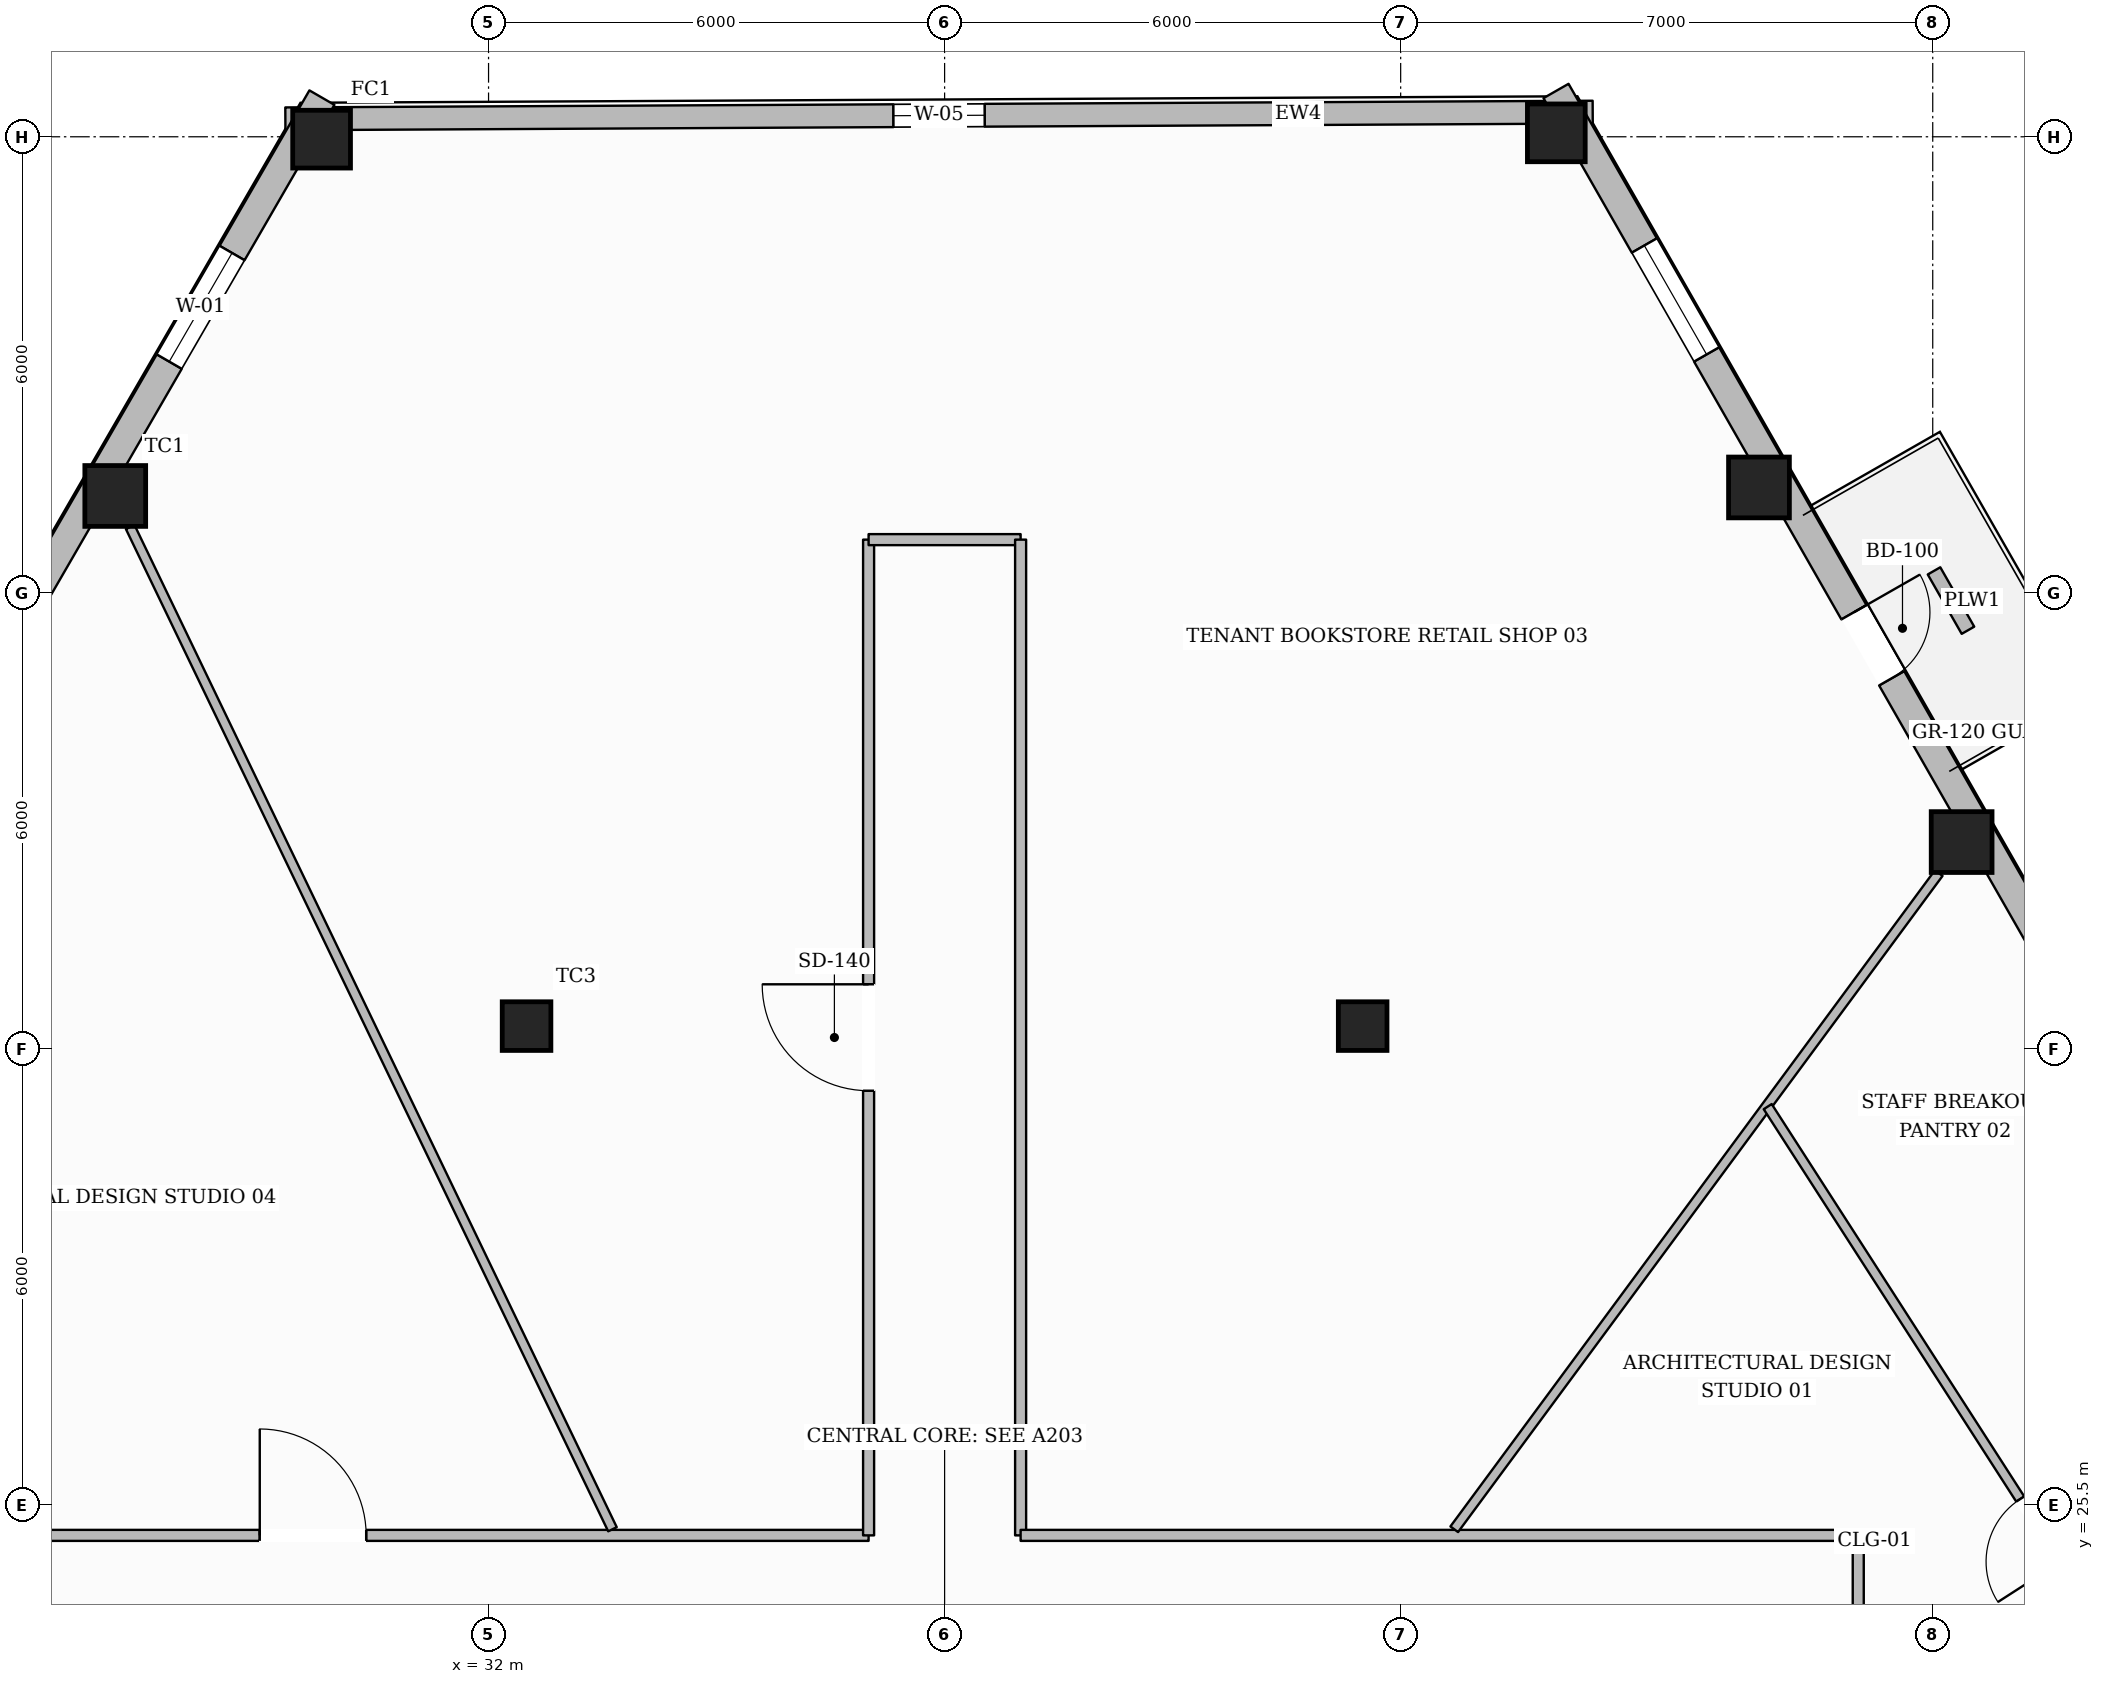
"""IFC4 building model, lengths in metres.
Left out: names, types, materials, properties, quantities, classifications, styles, units other than length and angle.
Written with IfcOpenShell. Run it as: python <this file> out.ifc"""

import sys

from ifc_helpers import new_model, si_unit, direction, frame, frame_2d, origin, origin_2d, place, context, subcontext, project, spatial, rectangle, hollow_rectangle, extrude, element, fill, save


model = new_model("IFC4")
c1 = context("Model", 3, precision=1e-05, world=origin(), true_north=direction((0.0, 1.0)))
c2 = subcontext(c1, "Body", "Model", "MODEL_VIEW")
j1 = project(units=[si_unit("LENGTHUNIT", "METRE"), si_unit("PLANEANGLEUNIT", "RADIAN")], contexts=[c1])
p1 = place(None, origin())
s1 = spatial("IfcSite", under=j1, at=p1, CompositionType="ELEMENT")
p2 = place(p1, origin())
s2 = spatial("IfcBuilding", under=s1, at=p2, CompositionType="ELEMENT")
p3 = place(p2, frame((0.0, 0.0, 9.85)))
s3 = spatial("IfcBuildingStorey", under=s2, at=p3, CompositionType="ELEMENT", Elevation=9.85)
p4 = place(p3, frame((29.803, 43.469, 0.0), z_axis=(0.0, 0.0, 1.0), x_axis=(1.0, 0.0, 0.0)))
e1 = element("IfcColumn", 1, at=p4, inside=s3, PredefinedType="COLUMN", context=c2, shape_type="SweptSolid", body=[
    extrude(hollow_rectangle(XDim=0.76, YDim=0.76, WallThickness=0.035, at=origin_2d()), origin(), (0.0, 0.0, 1.0), 3.59),
])
for number, where, z_axis, x_axis in (
    (2, (27.089, 38.774, 0.0), (0.0, 0.0, 1.0), (1.0, 0.0, 0.0)),
    (3, (51.38, 34.221, 0.0), (0.0, 0.0, 1.0), (1.0, 0.0, 0.0)),
    (4, (48.714, 38.886, 0.0), (0.0, 0.0, 1.0), (1.0, 0.0, 0.0)),
):
    element("IfcColumn", number, at=place(p3, frame(where, z_axis=z_axis, x_axis=x_axis)), inside=s3, PredefinedType="COLUMN", context=c2, shape_type="SweptSolid", body=[
        extrude(hollow_rectangle(XDim=0.8, YDim=0.8, WallThickness=0.036, at=origin_2d()), origin(), (0.0, 0.0, 1.0), 3.59),
    ])
p5 = place(p3, frame((46.048, 43.552, 0.0), z_axis=(0.0, 0.0, 1.0), x_axis=(1.0, 0.0, 0.0)))
e5 = element("IfcColumn", 5, at=p5, inside=s3, PredefinedType="COLUMN", context=c2, shape_type="SweptSolid", body=[
    extrude(hollow_rectangle(XDim=0.76, YDim=0.76, WallThickness=0.035, at=origin_2d()), origin(), (0.0, 0.0, 1.0), 3.59),
])
for number, where, z_axis, x_axis in (
    (6, (32.5, 31.8, 0.0), (0.0, 0.0, 1.0), (1.0, 0.0, 0.0)),
    (7, (43.5, 31.8, 0.0), (0.0, 0.0, 1.0), (1.0, 0.0, 0.0)),
):
    element("IfcColumn", number, at=place(p3, frame(where, z_axis=z_axis, x_axis=x_axis)), inside=s3, PredefinedType="COLUMN", context=c2, shape_type="SweptSolid", body=[
        extrude(hollow_rectangle(XDim=0.64, YDim=0.64, WallThickness=0.028, at=origin_2d()), origin(), (0.0, 0.0, 1.0), 3.59),
    ])
p6 = place(p3, frame((29.327, 43.736, 0.0), z_axis=(0.0, 0.0, 1.0), x_axis=(0.999986871538, 0.005124134289, 0.0)))
e8 = element("IfcWall", 8, at=p6, inside=s3, PredefinedType="STANDARD", context=c2, shape_type="SweptSolid", body=[
    extrude(rectangle(XDim=17.2, YDim=0.3, at=frame_2d((8.6, 0.0))), origin(), (0.0, 0.0, 1.0), 2.97),
])
p7 = place(p6, frame((8.0, 0.0, 0.65)))
e9 = element("IfcOpeningElement", 9, at=p7, cuts=e8, PredefinedType="OPENING", context=c2, shape_type="SweptSolid", body=[
    extrude(rectangle(XDim=1.2, YDim=1.7, at=frame_2d((0.6, 0.85))), frame((0.0, 0.16, 0.0), z_axis=(0.0, -1.0, 0.0), x_axis=(1.0, 0.0, 0.0)), (0.0, 0.0, 1.0), 0.32),
])
p8 = place(p3, frame((13.044, 15.027, 0.0), z_axis=(0.0, 0.0, 1.0), x_axis=(0.500616330433, 0.865669272704, 0.0)))
e10 = element("IfcWall", 10, at=p8, inside=s3, PredefinedType="STANDARD", context=c2, shape_type="SweptSolid", body=[
    extrude(rectangle(XDim=33.487, YDim=0.38, at=frame_2d((16.743, 0.0))), origin(), (0.0, 0.0, 1.0), 2.97),
])
p9 = place(p8, frame((7.972, 0.0, 0.0)))
e11 = element("IfcOpeningElement", 11, at=p9, cuts=e10, PredefinedType="OPENING", context=c2, shape_type="SweptSolid", body=[
    extrude(rectangle(XDim=1.0, YDim=2.2, at=frame_2d((0.5, 1.1))), frame((0.0, 0.2, 0.0), z_axis=(0.0, -1.0, 0.0), x_axis=(1.0, 0.0, 0.0)), (0.0, 0.0, 1.0), 0.4),
])
p10 = place(p8, frame((29.475, 0.0, 0.65)))
e12 = element("IfcOpeningElement", 12, at=p10, cuts=e10, PredefinedType="OPENING", context=c2, shape_type="SweptSolid", body=[
    extrude(rectangle(XDim=1.65, YDim=1.75, at=frame_2d((0.825, 0.875))), frame((0.0, 0.2, 0.0), z_axis=(0.0, -1.0, 0.0), x_axis=(1.0, 0.0, 0.0)), (0.0, 0.0, 1.0), 0.4),
])
p11 = place(p8, frame((24.052, 0.0, 0.65)))
e13 = element("IfcOpeningElement", 13, at=p11, cuts=e10, PredefinedType="OPENING", context=c2, shape_type="SweptSolid", body=[
    extrude(rectangle(XDim=1.65, YDim=1.75, at=frame_2d((0.825, 0.875))), frame((0.0, 0.2, 0.0), z_axis=(0.0, -1.0, 0.0), x_axis=(1.0, 0.0, 0.0)), (0.0, 0.0, 1.0), 0.4),
])
p12 = place(p8, frame((18.63, 0.0, 0.65)))
e14 = element("IfcOpeningElement", 14, at=p12, cuts=e10, PredefinedType="OPENING", context=c2, shape_type="SweptSolid", body=[
    extrude(rectangle(XDim=1.65, YDim=1.75, at=frame_2d((0.825, 0.875))), frame((0.0, 0.2, 0.0), z_axis=(0.0, -1.0, 0.0), x_axis=(1.0, 0.0, 0.0)), (0.0, 0.0, 1.0), 0.4),
])
p13 = place(p8, frame((2.362, 0.0, 0.65)))
e15 = element("IfcOpeningElement", 15, at=p13, cuts=e10, PredefinedType="OPENING", context=c2, shape_type="SweptSolid", body=[
    extrude(rectangle(XDim=1.65, YDim=1.75, at=frame_2d((0.825, 0.875))), frame((0.0, 0.2, 0.0), z_axis=(0.0, -1.0, 0.0), x_axis=(1.0, 0.0, 0.0)), (0.0, 0.0, 1.0), 0.4),
])
p14 = place(p3, frame((46.044, 44.103, 0.0), z_axis=(0.0, 0.0, 1.0), x_axis=(0.496189626602, -0.86821417545, 0.0)))
e16 = element("IfcWall", 16, at=p14, inside=s3, PredefinedType="STANDARD", context=c2, shape_type="SweptSolid", body=[
    extrude(rectangle(XDim=33.196, YDim=0.38, at=frame_2d((16.598, 0.0))), origin(), (0.0, 0.0, 1.0), 2.97),
])
p15 = place(p14, frame((7.899, 0.0, 0.0)))
e17 = element("IfcOpeningElement", 17, at=p15, cuts=e16, PredefinedType="OPENING", context=c2, shape_type="SweptSolid", body=[
    extrude(rectangle(XDim=1.0, YDim=2.2, at=frame_2d((0.5, 1.1))), frame((0.0, 0.2, 0.0), z_axis=(0.0, -1.0, 0.0), x_axis=(1.0, 0.0, 0.0)), (0.0, 0.0, 1.0), 0.4),
])
p16 = place(p14, frame((29.209, 0.0, 0.65)))
e18 = element("IfcOpeningElement", 18, at=p16, cuts=e16, PredefinedType="OPENING", context=c2, shape_type="SweptSolid", body=[
    extrude(rectangle(XDim=1.65, YDim=1.75, at=frame_2d((0.825, 0.875))), frame((0.0, 0.2, 0.0), z_axis=(0.0, -1.0, 0.0), x_axis=(1.0, 0.0, 0.0)), (0.0, 0.0, 1.0), 0.4),
])
p17 = place(p14, frame((23.835, 0.0, 0.65)))
e19 = element("IfcOpeningElement", 19, at=p17, cuts=e16, PredefinedType="OPENING", context=c2, shape_type="SweptSolid", body=[
    extrude(rectangle(XDim=1.65, YDim=1.75, at=frame_2d((0.825, 0.875))), frame((0.0, 0.2, 0.0), z_axis=(0.0, -1.0, 0.0), x_axis=(1.0, 0.0, 0.0)), (0.0, 0.0, 1.0), 0.4),
])
p18 = place(p14, frame((18.462, 0.0, 0.65)))
e20 = element("IfcOpeningElement", 20, at=p18, cuts=e16, PredefinedType="OPENING", context=c2, shape_type="SweptSolid", body=[
    extrude(rectangle(XDim=1.65, YDim=1.75, at=frame_2d((0.825, 0.875))), frame((0.0, 0.2, 0.0), z_axis=(0.0, -1.0, 0.0), x_axis=(1.0, 0.0, 0.0)), (0.0, 0.0, 1.0), 0.4),
])
p19 = place(p14, frame((2.342, 0.0, 0.65)))
e21 = element("IfcOpeningElement", 21, at=p19, cuts=e16, PredefinedType="OPENING", context=c2, shape_type="SweptSolid", body=[
    extrude(rectangle(XDim=1.65, YDim=1.75, at=frame_2d((0.825, 0.875))), frame((0.0, 0.2, 0.0), z_axis=(0.0, -1.0, 0.0), x_axis=(1.0, 0.0, 0.0)), (0.0, 0.0, 1.0), 0.4),
])
p20 = place(p3, frame((51.463, 37.008, 0.0), z_axis=(0.0, 0.0, 1.0), x_axis=(-0.496109726922, 0.868259833721, 0.0)))
e22 = element("IfcWall", 22, at=p20, inside=s3, PredefinedType="USERDEFINED", context=c2, shape_type="SweptSolid", body=[
    extrude(rectangle(XDim=0.9, YDim=0.19, at=frame_2d((0.45, 0.0))), origin(), (0.0, 0.0, 1.0), 0.5),
])
p21 = place(p3, frame((25.98, 25.1, 0.0), z_axis=(0.0, 0.0, 1.0), x_axis=(1.0, 0.0, 0.0)))
e23 = element("IfcWall", 23, at=p21, inside=s3, PredefinedType="PARTITIONING", context=c2, shape_type="SweptSolid", body=[
    extrude(rectangle(XDim=11.02, YDim=0.145, at=frame_2d((5.51, 0.0))), origin(), (0.0, 0.0, 1.0), 3.59),
])
p22 = place(p21, frame((3.01, 0.0, 0.0)))
e24 = element("IfcOpeningElement", 24, at=p22, cuts=e23, PredefinedType="OPENING", context=c2, shape_type="SweptSolid", body=[
    extrude(rectangle(XDim=1.4, YDim=2.2, at=frame_2d((0.7, 1.1))), frame((0.0, 0.083, 0.0), z_axis=(0.0, -1.0, 0.0), x_axis=(1.0, 0.0, 0.0)), (0.0, 0.0, 1.0), 0.165),
])
p23 = place(p3, frame((37.0, 25.1, 0.0), z_axis=(0.0, 0.0, 1.0), x_axis=(0.0, 1.0, 0.0)))
e25 = element("IfcWall", 25, at=p23, inside=s3, PredefinedType="PARTITIONING", context=c2, shape_type="SweptSolid", body=[
    extrude(rectangle(XDim=13.1, YDim=0.145, at=frame_2d((6.55, 0.0))), origin(), (0.0, 0.0, 1.0), 3.59),
])
p24 = place(p23, frame((5.85, 0.0, 0.0)))
e26 = element("IfcOpeningElement", 26, at=p24, cuts=e25, PredefinedType="OPENING", context=c2, shape_type="SweptSolid", body=[
    extrude(rectangle(XDim=1.4, YDim=2.2, at=frame_2d((0.7, 1.1))), frame((0.0, 0.083, 0.0), z_axis=(0.0, -1.0, 0.0), x_axis=(1.0, 0.0, 0.0)), (0.0, 0.0, 1.0), 0.165),
])
p25 = place(p3, frame((37.0, 38.2, 0.0), z_axis=(0.0, 0.0, 1.0), x_axis=(1.0, 0.0, 0.0)))
e27 = element("IfcWall", 27, at=p25, inside=s3, PredefinedType="PARTITIONING", context=c2, shape_type="SweptSolid", body=[
    extrude(rectangle(XDim=2.0, YDim=0.145, at=frame_2d((1.0, 0.0))), origin(), (0.0, 0.0, 1.0), 3.59),
])
p26 = place(p3, frame((39.0, 38.2, 0.0), z_axis=(0.0, 0.0, 1.0), x_axis=(0.0, -1.0, 0.0)))
e28 = element("IfcWall", 28, at=p26, inside=s3, PredefinedType="PARTITIONING", context=c2, shape_type="SweptSolid", body=[
    extrude(rectangle(XDim=13.1, YDim=0.145, at=frame_2d((6.55, 0.0))), origin(), (0.0, 0.0, 1.0), 3.59),
])
p27 = place(p3, frame((39.0, 25.1, 0.0), z_axis=(0.0, 0.0, 1.0), x_axis=(1.0, 0.0, 0.0)))
e29 = element("IfcWall", 29, at=p27, inside=s3, PredefinedType="PARTITIONING", context=c2, shape_type="SweptSolid", body=[
    extrude(rectangle(XDim=11.02, YDim=0.145, at=frame_2d((5.51, 0.0))), origin(), (0.0, 0.0, 1.0), 3.59),
])
p28 = place(p3, frame((50.02, 25.1, 0.0), z_axis=(0.0, 0.0, 1.0), x_axis=(0.0, -1.0, 0.0)))
e30 = element("IfcWall", 30, at=p28, inside=s3, PredefinedType="PARTITIONING", context=c2, shape_type="SweptSolid", body=[
    extrude(rectangle(XDim=16.0, YDim=0.145, at=frame_2d((8.0, 0.0))), origin(), (0.0, 0.0, 1.0), 3.278),
])
p29 = place(p28, frame((2.927, 0.0, 0.0)))
e31 = element("IfcOpeningElement", 31, at=p29, cuts=e30, PredefinedType="OPENING", context=c2, shape_type="SweptSolid", body=[
    extrude(rectangle(XDim=0.98, YDim=2.15, at=frame_2d((0.49, 1.075))), frame((0.0, 0.083, 0.0), z_axis=(0.0, -1.0, 0.0), x_axis=(1.0, 0.0, 0.0)), (0.0, 0.0, 1.0), 0.165),
])
p30 = place(p3, frame((44.705, 25.18, 0.0), z_axis=(0.0, 0.0, 1.0), x_axis=(0.593984136355, 0.804476752777, 0.0)))
e32 = element("IfcWall", 32, at=p30, inside=s3, PredefinedType="PARTITIONING", context=c2, shape_type="SweptSolid", body=[
    extrude(rectangle(XDim=10.731, YDim=0.125, at=frame_2d((5.365, 0.0))), origin(), (0.0, 0.0, 1.0), 3.057),
])
p31 = place(p3, frame((33.63, 25.18, 0.0), z_axis=(0.0, 0.0, 1.0), x_axis=(-0.433614955138, 0.901098258061, 0.0)))
e33 = element("IfcWall", 33, at=p31, inside=s3, PredefinedType="PARTITIONING", context=c2, shape_type="SweptSolid", body=[
    extrude(rectangle(XDim=14.633, YDim=0.125, at=frame_2d((7.317, 0.0))), origin(), (0.0, 0.0, 1.0), 3.057),
])
p32 = place(p3, frame((56.005, 19.59, 0.0), z_axis=(0.0, 0.0, 1.0), x_axis=(-0.541141843648, 0.840931331949, 0.0)))
e34 = element("IfcWall", 34, at=p32, inside=s3, PredefinedType="PARTITIONING", context=c2, shape_type="SweptSolid", body=[
    extrude(rectangle(XDim=13.26, YDim=0.125, at=frame_2d((6.63, 0.0))), origin(), (0.0, 0.0, 1.0), 3.59),
])
p33 = place(p32, frame((6.141, 0.0, 0.0)))
e35 = element("IfcOpeningElement", 35, at=p33, cuts=e34, PredefinedType="OPENING", context=c2, shape_type="SweptSolid", body=[
    extrude(rectangle(XDim=0.98, YDim=2.15, at=frame_2d((0.49, 1.075))), frame((0.0, 0.073, 0.0), z_axis=(0.0, -1.0, 0.0), x_axis=(1.0, 0.0, 0.0)), (0.0, 0.0, 1.0), 0.145),
])
p34 = place(p15, origin())
e36 = element("IfcDoor", 36, at=p34, inside=s3, OperationType="SINGLE_SWING_LEFT", PredefinedType="DOOR", context=c2, shape_type="SweptSolid", body=[
    extrude(rectangle(XDim=1.0, YDim=2.2, at=frame_2d((0.5, 1.1))), frame((0.0, 0.025, 0.0), z_axis=(0.0, -1.0, 0.0), x_axis=(1.0, 0.0, 0.0)), (0.0, 0.0, 1.0), 0.05),
])
fill(e17, e36)
p35 = place(p10, origin())
e37 = element("IfcWindow", 37, at=p35, inside=s3, PartitioningType="SINGLE_PANEL", PredefinedType="WINDOW", context=c2, shape_type="SweptSolid", body=[
    extrude(rectangle(XDim=1.65, YDim=1.75, at=frame_2d((0.825, 0.875))), frame((0.0, 0.03, 0.0), z_axis=(0.0, -1.0, 0.0), x_axis=(1.0, 0.0, 0.0)), (0.0, 0.0, 1.0), 0.06),
])
fill(e12, e37)
p36 = place(p19, origin())
e38 = element("IfcWindow", 38, at=p36, inside=s3, PartitioningType="SINGLE_PANEL", PredefinedType="WINDOW", context=c2, shape_type="SweptSolid", body=[
    extrude(rectangle(XDim=1.65, YDim=1.75, at=frame_2d((0.825, 0.875))), frame((0.0, 0.03, 0.0), z_axis=(0.0, -1.0, 0.0), x_axis=(1.0, 0.0, 0.0)), (0.0, 0.0, 1.0), 0.06),
])
fill(e21, e38)
p37 = place(p7, origin())
e39 = element("IfcWindow", 39, at=p37, inside=s3, PartitioningType="SINGLE_PANEL", PredefinedType="WINDOW", context=c2, shape_type="SweptSolid", body=[
    extrude(rectangle(XDim=1.2, YDim=1.7, at=frame_2d((0.6, 0.85))), frame((0.0, 0.03, 0.0), z_axis=(0.0, -1.0, 0.0), x_axis=(1.0, 0.0, 0.0)), (0.0, 0.0, 1.0), 0.06),
])
fill(e9, e39)
p38 = place(p33, origin())
e40 = element("IfcDoor", 40, at=p38, inside=s3, OperationType="SINGLE_SWING_LEFT", PredefinedType="DOOR", context=c2, shape_type="SweptSolid", body=[
    extrude(rectangle(XDim=0.98, YDim=2.15, at=frame_2d((0.49, 1.075))), frame((0.0, 0.025, 0.0), z_axis=(0.0, -1.0, 0.0), x_axis=(1.0, 0.0, 0.0)), (0.0, 0.0, 1.0), 0.05),
])
fill(e35, e40)
p39 = place(p24, origin())
e41 = element("IfcDoor", 41, at=p39, inside=s3, OperationType="SINGLE_SWING_RIGHT", PredefinedType="DOOR", context=c2, shape_type="SweptSolid", body=[
    extrude(rectangle(XDim=1.4, YDim=2.2, at=frame_2d((0.7, 1.1))), frame((0.0, 0.025, 0.0), z_axis=(0.0, -1.0, 0.0), x_axis=(1.0, 0.0, 0.0)), (0.0, 0.0, 1.0), 0.05),
])
fill(e26, e41)
p40 = place(p22, origin())
e42 = element("IfcDoor", 42, at=p40, inside=s3, OperationType="SINGLE_SWING_LEFT", PredefinedType="DOOR", context=c2, shape_type="SweptSolid", body=[
    extrude(rectangle(XDim=1.4, YDim=2.2, at=frame_2d((0.7, 1.1))), frame((0.0, 0.025, 0.0), z_axis=(0.0, -1.0, 0.0), x_axis=(1.0, 0.0, 0.0)), (0.0, 0.0, 1.0), 0.05),
])
fill(e24, e42)
save(model, sys.argv[1])
